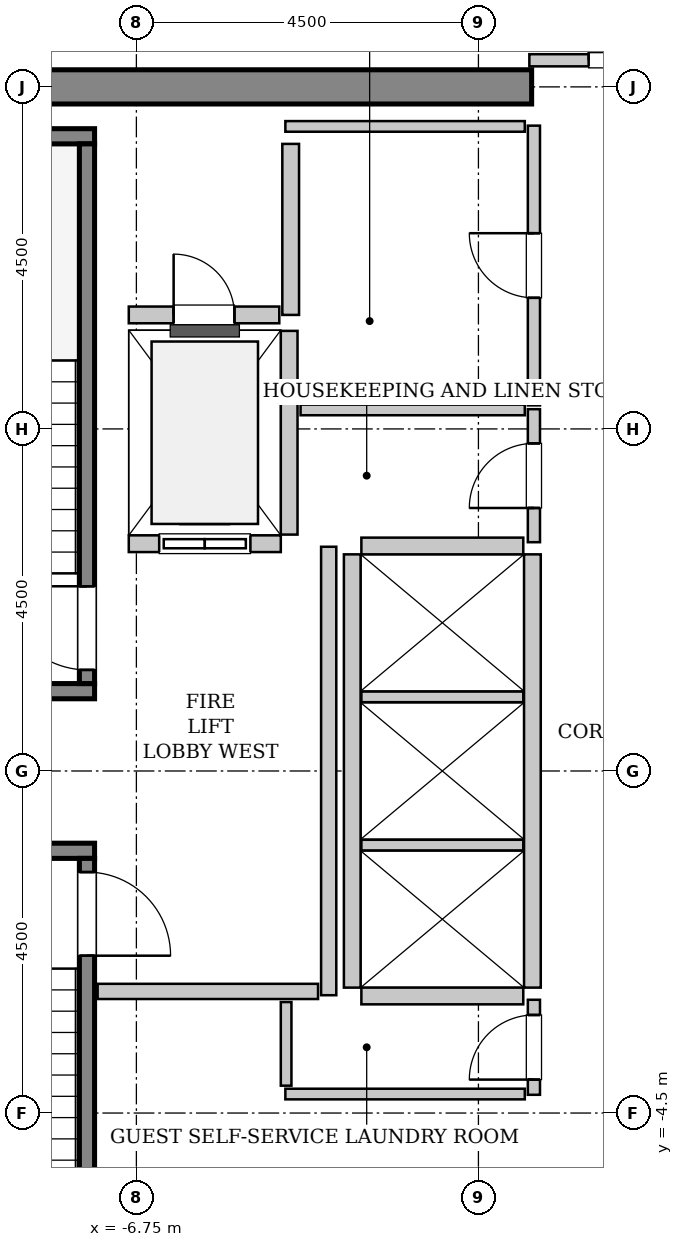
"""IFC4 building model, lengths in metres.
Left out: names, types, materials, properties, quantities, classifications, styles, units other than length and angle.
Written with IfcOpenShell. Run it as: python <this file> out.ifc"""

import sys

from ifc_helpers import new_model, si_unit, direction, frame, frame_2d, origin, place, context, subcontext, project, spatial, rectangle, extrude, source, transform, mapped, element, fill, save


model = new_model("IFC4")
c1 = context("Model", 3, precision=1e-05, world=origin(), true_north=direction((0.0, 1.0)))
c2 = subcontext(c1, "Body", "Model", "MODEL_VIEW")
j1 = project(units=[si_unit("LENGTHUNIT", "METRE"), si_unit("PLANEANGLEUNIT", "RADIAN")], contexts=[c1])
p1 = place(None, origin())
s1 = spatial("IfcSite", under=j1, at=p1, CompositionType="ELEMENT")
p2 = place(p1, origin())
s2 = spatial("IfcBuilding", under=s1, at=p2, CompositionType="ELEMENT")
p3 = place(p2, frame((0.0, 0.0, 218.0)))
s3 = spatial("IfcBuildingStorey", under=s2, at=p3, CompositionType="ELEMENT", Elevation=218.0)
m1 = source(origin(), c2, "Body", "SweptSolid", [
    extrude(rectangle(XDim=9.925, YDim=0.45, at=frame_2d((4.962, 0.0))), origin(), (0.0, 0.0, 1.0), 3.8),
])
p4 = place(p3, frame((-11.475, 9.0, 0.0), z_axis=(0.0, 0.0, 1.0), x_axis=(1.0, 0.0, 0.0)))
e1 = element("IfcWall", 1, at=p4, inside=s3, PredefinedType="SHEAR", context=c2, shape_type="MappedRepresentation", body=[
    mapped(m1, transform((0.0, 0.0, 0.0), x_axis=(1.0, 0.0, 0.0), y_axis=(0.0, 1.0, 0.0), z_axis=(0.0, 0.0, 1.0), scale=1.0)),
])
m2 = source(origin(), c2, "Body", "SweptSolid", [
    extrude(rectangle(XDim=3.4, YDim=0.2, at=frame_2d((1.7, 0.0))), origin(), (0.0, 0.0, 1.0), 3.8),
])
p5 = place(p3, frame((-7.3, 1.05, 0.0), z_axis=(0.0, 0.0, 1.0), x_axis=(-1.0, 0.0, 0.0)))
e2 = element("IfcWall", 2, at=p5, inside=s3, PredefinedType="SOLIDWALL", context=c2, shape_type="MappedRepresentation", body=[
    mapped(m2, transform((0.0, 0.0, 0.0), x_axis=(1.0, 0.0, 0.0), y_axis=(0.0, 1.0, 0.0), z_axis=(0.0, 0.0, 1.0), scale=1.0)),
])
m3 = source(origin(), c2, "Body", "SweptSolid", [
    extrude(rectangle(XDim=3.73, YDim=0.2, at=frame_2d((1.865, 0.0))), origin(), (0.0, 0.0, 1.0), 3.8),
])
p6 = place(p3, frame((-7.3, 8.35, 0.0), z_axis=(0.0, 0.0, 1.0), x_axis=(-1.0, 0.0, 0.0)))
e3 = element("IfcWall", 3, at=p6, inside=s3, PredefinedType="SOLIDWALL", context=c2, shape_type="MappedRepresentation", body=[
    mapped(m3, transform((0.0, 0.0, 0.0), x_axis=(1.0, 0.0, 0.0), y_axis=(0.0, 1.0, 0.0), z_axis=(0.0, 0.0, 1.0), scale=1.0)),
])
m4 = source(origin(), c2, "Body", "SweptSolid", [
    extrude(rectangle(XDim=7.1, YDim=0.2, at=frame_2d((3.55, 0.0))), origin(), (0.0, 0.0, 1.0), 3.8),
])
p7 = place(p3, frame((-7.4, 1.15, 0.0), z_axis=(0.0, 0.0, 1.0), x_axis=(0.0, 1.0, 0.0)))
e4 = element("IfcWall", 4, at=p7, inside=s3, PredefinedType="SOLIDWALL", context=c2, shape_type="MappedRepresentation", body=[
    mapped(m4, transform((0.0, 0.0, 0.0), x_axis=(1.0, 0.0, 0.0), y_axis=(0.0, 1.0, 0.0), z_axis=(0.0, 0.0, 1.0), scale=1.0)),
])
p8 = place(p7, frame((0.18, 0.0, 0.0)))
e5 = element("IfcOpeningElement", 5, at=p8, cuts=e4, PredefinedType="OPENING", context=c2, shape_type="SweptSolid", body=[
    extrude(rectangle(XDim=1.1, YDim=2.15, at=frame_2d((0.55, 1.075))), frame((0.0, 0.11, 0.0), z_axis=(0.0, -1.0, 0.0), x_axis=(1.0, 0.0, 0.0)), (0.0, 0.0, 1.0), 0.22),
])
p9 = place(p3, frame((-10.7, -1.05, 0.0), z_axis=(0.0, 0.0, 1.0), x_axis=(1.0, 0.0, 0.0)))
e6 = element("IfcWall", 6, at=p9, inside=s3, PredefinedType="SOLIDWALL", context=c2, shape_type="MappedRepresentation", body=[
    mapped(m2, transform((0.0, 0.0, 0.0), x_axis=(1.0, 0.0, 0.0), y_axis=(0.0, 1.0, 0.0), z_axis=(0.0, 0.0, 1.0), scale=1.0)),
])
p10 = place(p3, frame((-7.4, -1.15, 0.0), z_axis=(0.0, 0.0, 1.0), x_axis=(0.0, -1.0, 0.0)))
e7 = element("IfcWall", 7, at=p10, inside=s3, PredefinedType="SOLIDWALL", context=c2, shape_type="MappedRepresentation", body=[
    mapped(m4, transform((0.0, 0.0, 0.0), x_axis=(1.0, 0.0, 0.0), y_axis=(0.0, 1.0, 0.0), z_axis=(0.0, 0.0, 1.0), scale=1.0)),
])
p11 = place(p10, frame((0.18, 0.0, 0.0)))
e8 = element("IfcOpeningElement", 8, at=p11, cuts=e7, PredefinedType="OPENING", context=c2, shape_type="SweptSolid", body=[
    extrude(rectangle(XDim=1.1, YDim=2.15, at=frame_2d((0.55, 1.075))), frame((0.0, 0.11, 0.0), z_axis=(0.0, -1.0, 0.0), x_axis=(1.0, 0.0, 0.0)), (0.0, 0.0, 1.0), 0.22),
])
m5 = source(origin(), c2, "Body", "SweptSolid", [
    extrude(rectangle(XDim=2.0, YDim=0.22, at=frame_2d((1.0, 0.0))), origin(), (0.0, 0.0, 1.0), 3.535),
])
p12 = place(p3, frame((-6.85, 2.99, 0.0), z_axis=(0.0, 0.0, 1.0), x_axis=(1.0, 0.0, 0.0)))
e9 = element("IfcWall", 9, at=p12, inside=s3, PredefinedType="SOLIDWALL", context=c2, shape_type="MappedRepresentation", body=[
    mapped(m5, transform((0.0, 0.0, 0.0), x_axis=(1.0, 0.0, 0.0), y_axis=(0.0, 1.0, 0.0), z_axis=(0.0, 0.0, 1.0), scale=1.0)),
])
p13 = place(p12, frame((0.4, 0.0, 0.0)))
e10 = element("IfcOpeningElement", 10, at=p13, cuts=e9, PredefinedType="OPENING", context=c2, shape_type="SweptSolid", body=[
    extrude(rectangle(XDim=1.2, YDim=2.2, at=frame_2d((0.6, 1.1))), frame((0.0, 0.12, 0.0), z_axis=(0.0, -1.0, 0.0), x_axis=(1.0, 0.0, 0.0)), (0.0, 0.0, 1.0), 0.24),
])
m6 = source(origin(), c2, "Body", "SweptSolid", [
    extrude(rectangle(XDim=2.68, YDim=0.22, at=frame_2d((1.34, 0.0))), origin(), (0.0, 0.0, 1.0), 3.535),
])
p14 = place(p3, frame((-4.74, 3.11, 0.0), z_axis=(0.0, 0.0, 1.0), x_axis=(0.0, 1.0, 0.0)))
e11 = element("IfcWall", 11, at=p14, inside=s3, PredefinedType="SOLIDWALL", context=c2, shape_type="MappedRepresentation", body=[
    mapped(m6, transform((0.0, 0.0, 0.0), x_axis=(1.0, 0.0, 0.0), y_axis=(0.0, 1.0, 0.0), z_axis=(0.0, 0.0, 1.0), scale=1.0)),
])
m7 = source(origin(), c2, "Body", "SweptSolid", [
    extrude(rectangle(XDim=5.7, YDim=0.22, at=frame_2d((2.85, 0.0))), origin(), (0.0, 0.0, 1.0), 3.535),
])
for number, where, z_axis, x_axis in (
    (12, (-1.54, -2.85, 0.0), (0.0, 0.0, 1.0), (0.0, 1.0, 0.0)),
    (13, (-3.91, 2.85, 0.0), (0.0, 0.0, 1.0), (0.0, -1.0, 0.0)),
):
    element("IfcWall", number, at=place(p3, frame(where, z_axis=z_axis, x_axis=x_axis)), inside=s3, PredefinedType="SOLIDWALL", context=c2, shape_type="MappedRepresentation", body=[
        mapped(m7, transform((0.0, 0.0, 0.0), x_axis=(1.0, 0.0, 0.0), y_axis=(0.0, 1.0, 0.0), z_axis=(0.0, 0.0, 1.0), scale=1.0)),
    ])
m8 = source(origin(), c2, "Body", "SweptSolid", [
    extrude(rectangle(XDim=2.13, YDim=0.22, at=frame_2d((1.065, 0.0))), origin(), (0.0, 0.0, 1.0), 3.535),
])
p15 = place(p3, frame((-3.79, -2.96, 0.0), z_axis=(0.0, 0.0, 1.0), x_axis=(1.0, 0.0, 0.0)))
e14 = element("IfcWall", 14, at=p15, inside=s3, PredefinedType="SOLIDWALL", context=c2, shape_type="MappedRepresentation", body=[
    mapped(m8, transform((0.0, 0.0, 0.0), x_axis=(1.0, 0.0, 0.0), y_axis=(0.0, 1.0, 0.0), z_axis=(0.0, 0.0, 1.0), scale=1.0)),
])
m9 = source(origin(), c2, "Body", "SweptSolid", [
    extrude(rectangle(XDim=2.13, YDim=0.14, at=frame_2d((1.065, 0.0))), origin(), (0.0, 0.0, 1.0), 3.535),
])
for number, where, z_axis, x_axis in (
    (15, (-3.79, -0.975, 0.0), (0.0, 0.0, 1.0), (1.0, 0.0, 0.0)),
    (16, (-3.79, 0.975, 0.0), (0.0, 0.0, 1.0), (1.0, 0.0, 0.0)),
):
    element("IfcWall", number, at=place(p3, frame(where, z_axis=z_axis, x_axis=x_axis)), inside=s3, PredefinedType="PARTITIONING", context=c2, shape_type="MappedRepresentation", body=[
        mapped(m9, transform((0.0, 0.0, 0.0), x_axis=(1.0, 0.0, 0.0), y_axis=(0.0, 1.0, 0.0), z_axis=(0.0, 0.0, 1.0), scale=1.0)),
    ])
p16 = place(p3, frame((-1.66, 2.96, 0.0), z_axis=(0.0, 0.0, 1.0), x_axis=(-1.0, 0.0, 0.0)))
e17 = element("IfcWall", 17, at=p16, inside=s3, PredefinedType="SOLIDWALL", context=c2, shape_type="MappedRepresentation", body=[
    mapped(m8, transform((0.0, 0.0, 0.0), x_axis=(1.0, 0.0, 0.0), y_axis=(0.0, 1.0, 0.0), z_axis=(0.0, 0.0, 1.0), scale=1.0)),
])
m10 = source(origin(), c2, "Body", "SweptSolid", [
    extrude(rectangle(XDim=2.25, YDim=0.22, at=frame_2d((1.125, 0.0))), origin(), (0.0, 0.0, 1.0), 3.535),
])
p17 = place(p3, frame((-4.72, 6.0, 0.0), z_axis=(0.0, 0.0, 1.0), x_axis=(0.0, 1.0, 0.0)))
e18 = element("IfcWall", 18, at=p17, inside=s3, PredefinedType="SOLIDWALL", context=c2, shape_type="MappedRepresentation", body=[
    mapped(m10, transform((0.0, 0.0, 0.0), x_axis=(1.0, 0.0, 0.0), y_axis=(0.0, 1.0, 0.0), z_axis=(0.0, 0.0, 1.0), scale=1.0)),
])
m11 = source(origin(), c2, "Body", "SweptSolid", [
    extrude(rectangle(XDim=1.98, YDim=0.22, at=frame_2d((0.99, 0.0))), origin(), (0.0, 0.0, 1.0), 3.535),
])
p18 = place(p3, frame((-6.85, 6.0, 0.0), z_axis=(0.0, 0.0, 1.0), x_axis=(1.0, 0.0, 0.0)))
e19 = element("IfcWall", 19, at=p18, inside=s3, PredefinedType="SOLIDWALL", context=c2, shape_type="MappedRepresentation", body=[
    mapped(m11, transform((0.0, 0.0, 0.0), x_axis=(1.0, 0.0, 0.0), y_axis=(0.0, 1.0, 0.0), z_axis=(0.0, 0.0, 1.0), scale=1.0)),
])
p19 = place(p18, frame((0.59, 0.0, 0.0)))
e20 = element("IfcOpeningElement", 20, at=p19, cuts=e19, PredefinedType="OPENING", context=c2, shape_type="SweptSolid", body=[
    extrude(rectangle(XDim=0.8, YDim=2.0, at=frame_2d((0.4, 1.0))), frame((0.0, 0.12, 0.0), z_axis=(0.0, -1.0, 0.0), x_axis=(1.0, 0.0, 0.0)), (0.0, 0.0, 1.0), 0.24),
])
m12 = source(origin(), c2, "Body", "SweptSolid", [
    extrude(rectangle(XDim=5.9, YDim=0.2, at=frame_2d((2.95, 0.0))), origin(), (0.0, 0.0, 1.0), 3.535),
])
p20 = place(p3, frame((-4.22, -2.95, 0.0), z_axis=(0.0, 0.0, 1.0), x_axis=(0.0, 1.0, 0.0)))
e21 = element("IfcWall", 21, at=p20, inside=s3, PredefinedType="PARTITIONING", context=c2, shape_type="MappedRepresentation", body=[
    mapped(m12, transform((0.0, 0.0, 0.0), x_axis=(1.0, 0.0, 0.0), y_axis=(0.0, 1.0, 0.0), z_axis=(0.0, 0.0, 1.0), scale=1.0)),
])
m13 = source(origin(), c2, "Body", "SweptSolid", [
    extrude(rectangle(XDim=2.9, YDim=0.2, at=frame_2d((1.45, 0.0))), origin(), (0.0, 0.0, 1.0), 3.535),
])
p21 = place(p3, frame((-7.26, -2.9, 0.0), z_axis=(0.0, 0.0, 1.0), x_axis=(1.0, 0.0, 0.0)))
e22 = element("IfcWall", 22, at=p21, inside=s3, PredefinedType="PARTITIONING", context=c2, shape_type="MappedRepresentation", body=[
    mapped(m13, transform((0.0, 0.0, 0.0), x_axis=(1.0, 0.0, 0.0), y_axis=(0.0, 1.0, 0.0), z_axis=(0.0, 0.0, 1.0), scale=1.0)),
])
m14 = source(origin(), c2, "Body", "SweptSolid", [
    extrude(rectangle(XDim=3.16, YDim=0.16, at=frame_2d((1.58, 0.0))), origin(), (0.0, 0.0, 1.0), 2.625),
])
p22 = place(p3, frame((-1.58, 9.35, 0.0), z_axis=(0.0, 0.0, 1.0), x_axis=(1.0, 0.0, 0.0)))
e23 = element("IfcWall", 23, at=p22, inside=s3, PredefinedType="PARTITIONING", context=c2, shape_type="MappedRepresentation", body=[
    mapped(m14, transform((0.0, 0.0, 0.0), x_axis=(1.0, 0.0, 0.0), y_axis=(0.0, 1.0, 0.0), z_axis=(0.0, 0.0, 1.0), scale=1.0)),
])
p23 = place(p22, frame((0.78, 0.0, 0.0)))
e24 = element("IfcOpeningElement", 24, at=p23, cuts=e23, PredefinedType="OPENING", context=c2, shape_type="SweptSolid", body=[
    extrude(rectangle(XDim=1.6, YDim=2.3, at=frame_2d((0.8, 1.15))), frame((0.0, 0.09, 0.0), z_axis=(0.0, -1.0, 0.0), x_axis=(1.0, 0.0, 0.0)), (0.0, 0.0, 1.0), 0.18),
])
m15 = source(origin(), c2, "Body", "SweptSolid", [
    extrude(rectangle(XDim=1.75, YDim=0.16, at=frame_2d((0.875, 0.0))), origin(), (0.0, 0.0, 1.0), 3.535),
])
p24 = place(p3, frame((-1.52, 3.01, 0.0), z_axis=(0.0, 0.0, 1.0), x_axis=(0.0, 1.0, 0.0)))
e25 = element("IfcWall", 25, at=p24, inside=s3, PredefinedType="PARTITIONING", context=c2, shape_type="MappedRepresentation", body=[
    mapped(m15, transform((0.0, 0.0, 0.0), x_axis=(1.0, 0.0, 0.0), y_axis=(0.0, 1.0, 0.0), z_axis=(0.0, 0.0, 1.0), scale=1.0)),
])
p25 = place(p24, frame((0.45, 0.0, 0.0)))
e26 = element("IfcOpeningElement", 26, at=p25, cuts=e25, PredefinedType="OPENING", context=c2, shape_type="SweptSolid", body=[
    extrude(rectangle(XDim=0.85, YDim=2.1, at=frame_2d((0.425, 1.05))), frame((0.0, 0.09, 0.0), z_axis=(0.0, -1.0, 0.0), x_axis=(1.0, 0.0, 0.0)), (0.0, 0.0, 1.0), 0.18),
])
m16 = source(origin(), c2, "Body", "SweptSolid", [
    extrude(rectangle(XDim=2.95, YDim=0.14, at=frame_2d((1.475, 0.0))), origin(), (0.0, 0.0, 1.0), 3.535),
])
p26 = place(p3, frame((-4.59, 4.75, 0.0), z_axis=(0.0, 0.0, 1.0), x_axis=(1.0, 0.0, 0.0)))
e27 = element("IfcWall", 27, at=p26, inside=s3, PredefinedType="PARTITIONING", context=c2, shape_type="MappedRepresentation", body=[
    mapped(m16, transform((0.0, 0.0, 0.0), x_axis=(1.0, 0.0, 0.0), y_axis=(0.0, 1.0, 0.0), z_axis=(0.0, 0.0, 1.0), scale=1.0)),
])
m17 = source(origin(), c2, "Body", "SweptSolid", [
    extrude(rectangle(XDim=3.68, YDim=0.16, at=frame_2d((1.84, 0.0))), origin(), (0.0, 0.0, 1.0), 3.535),
])
p27 = place(p3, frame((-1.52, 4.81, 0.0), z_axis=(0.0, 0.0, 1.0), x_axis=(0.0, 1.0, 0.0)))
e28 = element("IfcWall", 28, at=p27, inside=s3, PredefinedType="PARTITIONING", context=c2, shape_type="MappedRepresentation", body=[
    mapped(m17, transform((0.0, 0.0, 0.0), x_axis=(1.0, 0.0, 0.0), y_axis=(0.0, 1.0, 0.0), z_axis=(0.0, 0.0, 1.0), scale=1.0)),
])
p28 = place(p27, frame((1.415, 0.0, 0.0)))
e29 = element("IfcOpeningElement", 29, at=p28, cuts=e28, PredefinedType="OPENING", context=c2, shape_type="SweptSolid", body=[
    extrude(rectangle(XDim=0.85, YDim=2.1, at=frame_2d((0.425, 1.05))), frame((0.0, 0.09, 0.0), z_axis=(0.0, -1.0, 0.0), x_axis=(1.0, 0.0, 0.0)), (0.0, 0.0, 1.0), 0.18),
])
m18 = source(origin(), c2, "Body", "SweptSolid", [
    extrude(rectangle(XDim=3.15, YDim=0.14, at=frame_2d((1.575, 0.0))), origin(), (0.0, 0.0, 1.0), 3.535),
])
p29 = place(p3, frame((-4.79, 8.48, 0.0), z_axis=(0.0, 0.0, 1.0), x_axis=(1.0, 0.0, 0.0)))
e30 = element("IfcWall", 30, at=p29, inside=s3, PredefinedType="PARTITIONING", context=c2, shape_type="MappedRepresentation", body=[
    mapped(m18, transform((0.0, 0.0, 0.0), x_axis=(1.0, 0.0, 0.0), y_axis=(0.0, 1.0, 0.0), z_axis=(0.0, 0.0, 1.0), scale=1.0)),
])
m19 = source(origin(), c2, "Body", "SweptSolid", [
    extrude(rectangle(XDim=1.25, YDim=0.16, at=frame_2d((0.625, 0.0))), origin(), (0.0, 0.0, 1.0), 3.535),
])
p30 = place(p3, frame((-1.52, -4.26, 0.0), z_axis=(0.0, 0.0, 1.0), x_axis=(0.0, 1.0, 0.0)))
e31 = element("IfcWall", 31, at=p30, inside=s3, PredefinedType="PARTITIONING", context=c2, shape_type="MappedRepresentation", body=[
    mapped(m19, transform((0.0, 0.0, 0.0), x_axis=(1.0, 0.0, 0.0), y_axis=(0.0, 1.0, 0.0), z_axis=(0.0, 0.0, 1.0), scale=1.0)),
])
p31 = place(p30, frame((0.2, 0.0, 0.0)))
e32 = element("IfcOpeningElement", 32, at=p31, cuts=e31, PredefinedType="OPENING", context=c2, shape_type="SweptSolid", body=[
    extrude(rectangle(XDim=0.85, YDim=2.1, at=frame_2d((0.425, 1.05))), frame((0.0, 0.09, 0.0), z_axis=(0.0, -1.0, 0.0), x_axis=(1.0, 0.0, 0.0)), (0.0, 0.0, 1.0), 0.18),
])
p32 = place(p3, frame((-4.79, -4.25, 0.0), z_axis=(0.0, 0.0, 1.0), x_axis=(1.0, 0.0, 0.0)))
e33 = element("IfcWall", 33, at=p32, inside=s3, PredefinedType="PARTITIONING", context=c2, shape_type="MappedRepresentation", body=[
    mapped(m18, transform((0.0, 0.0, 0.0), x_axis=(1.0, 0.0, 0.0), y_axis=(0.0, 1.0, 0.0), z_axis=(0.0, 0.0, 1.0), scale=1.0)),
])
m20 = source(origin(), c2, "Body", "SweptSolid", [
    extrude(rectangle(XDim=1.1, YDim=0.14, at=frame_2d((0.55, 0.0))), origin(), (0.0, 0.0, 1.0), 3.535),
])
p33 = place(p3, frame((-4.78, -4.14, 0.0), z_axis=(0.0, 0.0, 1.0), x_axis=(0.0, 1.0, 0.0)))
e34 = element("IfcWall", 34, at=p33, inside=s3, PredefinedType="PARTITIONING", context=c2, shape_type="MappedRepresentation", body=[
    mapped(m20, transform((0.0, 0.0, 0.0), x_axis=(1.0, 0.0, 0.0), y_axis=(0.0, 1.0, 0.0), z_axis=(0.0, 0.0, 1.0), scale=1.0)),
])
m21 = source(origin(), c2, "Body", "SweptSolid", [
    extrude(rectangle(XDim=1.1, YDim=2.15, at=frame_2d((0.55, 1.075))), frame((0.0, 0.025, 0.0), z_axis=(0.0, -1.0, 0.0), x_axis=(1.0, 0.0, 0.0)), (0.0, 0.0, 1.0), 0.05),
])
p34 = place(p8, origin())
e35 = element("IfcDoor", 35, at=p34, inside=s3, OperationType="SINGLE_SWING_RIGHT", PredefinedType="DOOR", context=c2, shape_type="MappedRepresentation", body=[
    mapped(m21, transform((0.0, 0.0, 0.0), x_axis=(1.0, 0.0, 0.0), y_axis=(0.0, 1.0, 0.0), z_axis=(0.0, 0.0, 1.0), scale=1.0)),
])
fill(e5, e35)
p35 = place(p11, origin())
e36 = element("IfcDoor", 36, at=p35, inside=s3, OperationType="SINGLE_SWING_RIGHT", PredefinedType="DOOR", context=c2, shape_type="MappedRepresentation", body=[
    mapped(m21, transform((0.0, 0.0, 0.0), x_axis=(1.0, 0.0, 0.0), y_axis=(0.0, 1.0, 0.0), z_axis=(0.0, 0.0, 1.0), scale=1.0)),
])
fill(e8, e36)
m22 = source(origin(), c2, "Body", "SweptSolid", [
    extrude(rectangle(XDim=1.2, YDim=2.2, at=frame_2d((0.6, 1.1))), frame((0.0, 0.025, 0.0), z_axis=(0.0, -1.0, 0.0), x_axis=(1.0, 0.0, 0.0)), (0.0, 0.0, 1.0), 0.05),
])
p36 = place(p13, origin())
e37 = element("IfcDoor", 37, at=p36, inside=s3, OperationType="SLIDING_TO_LEFT", PredefinedType="DOOR", context=c2, shape_type="MappedRepresentation", body=[
    mapped(m22, transform((0.0, 0.0, 0.0), x_axis=(1.0, 0.0, 0.0), y_axis=(0.0, 1.0, 0.0), z_axis=(0.0, 0.0, 1.0), scale=1.0)),
])
fill(e10, e37)
m23 = source(origin(), c2, "Body", "SweptSolid", [
    extrude(rectangle(XDim=0.8, YDim=2.0, at=frame_2d((0.4, 1.0))), frame((0.0, 0.025, 0.0), z_axis=(0.0, -1.0, 0.0), x_axis=(1.0, 0.0, 0.0)), (0.0, 0.0, 1.0), 0.05),
])
p37 = place(p19, origin())
e38 = element("IfcDoor", 38, at=p37, inside=s3, OperationType="SINGLE_SWING_LEFT", PredefinedType="TRAPDOOR", context=c2, shape_type="MappedRepresentation", body=[
    mapped(m23, transform((0.0, 0.0, 0.0), x_axis=(1.0, 0.0, 0.0), y_axis=(0.0, 1.0, 0.0), z_axis=(0.0, 0.0, 1.0), scale=1.0)),
])
fill(e20, e38)
m24 = source(origin(), c2, "Body", "SweptSolid", [
    extrude(rectangle(XDim=1.6, YDim=2.3, at=frame_2d((0.8, 1.15))), frame((0.0, 0.025, 0.0), z_axis=(0.0, -1.0, 0.0), x_axis=(1.0, 0.0, 0.0)), (0.0, 0.0, 1.0), 0.05),
])
p38 = place(p23, origin())
e39 = element("IfcDoor", 39, at=p38, inside=s3, OperationType="DOUBLE_DOOR_SINGLE_SWING", PredefinedType="DOOR", context=c2, shape_type="MappedRepresentation", body=[
    mapped(m24, transform((0.0, 0.0, 0.0), x_axis=(1.0, 0.0, 0.0), y_axis=(0.0, 1.0, 0.0), z_axis=(0.0, 0.0, 1.0), scale=1.0)),
])
fill(e24, e39)
m25 = source(origin(), c2, "Body", "SweptSolid", [
    extrude(rectangle(XDim=0.85, YDim=2.1, at=frame_2d((0.425, 1.05))), frame((0.0, 0.025, 0.0), z_axis=(0.0, -1.0, 0.0), x_axis=(1.0, 0.0, 0.0)), (0.0, 0.0, 1.0), 0.05),
])
p39 = place(p25, origin())
e40 = element("IfcDoor", 40, at=p39, inside=s3, OperationType="SINGLE_SWING_LEFT", PredefinedType="DOOR", context=c2, shape_type="MappedRepresentation", body=[
    mapped(m25, transform((0.0, 0.0, 0.0), x_axis=(1.0, 0.0, 0.0), y_axis=(0.0, 1.0, 0.0), z_axis=(0.0, 0.0, 1.0), scale=1.0)),
])
fill(e26, e40)
p40 = place(p28, origin())
e41 = element("IfcDoor", 41, at=p40, inside=s3, OperationType="SINGLE_SWING_RIGHT", PredefinedType="DOOR", context=c2, shape_type="MappedRepresentation", body=[
    mapped(m25, transform((0.0, 0.0, 0.0), x_axis=(1.0, 0.0, 0.0), y_axis=(0.0, 1.0, 0.0), z_axis=(0.0, 0.0, 1.0), scale=1.0)),
])
fill(e29, e41)
p41 = place(p31, origin())
e42 = element("IfcDoor", 42, at=p41, inside=s3, OperationType="SINGLE_SWING_LEFT", PredefinedType="DOOR", context=c2, shape_type="MappedRepresentation", body=[
    mapped(m25, transform((0.0, 0.0, 0.0), x_axis=(1.0, 0.0, 0.0), y_axis=(0.0, 1.0, 0.0), z_axis=(0.0, 0.0, 1.0), scale=1.0)),
])
fill(e32, e42)
save(model, sys.argv[1])
